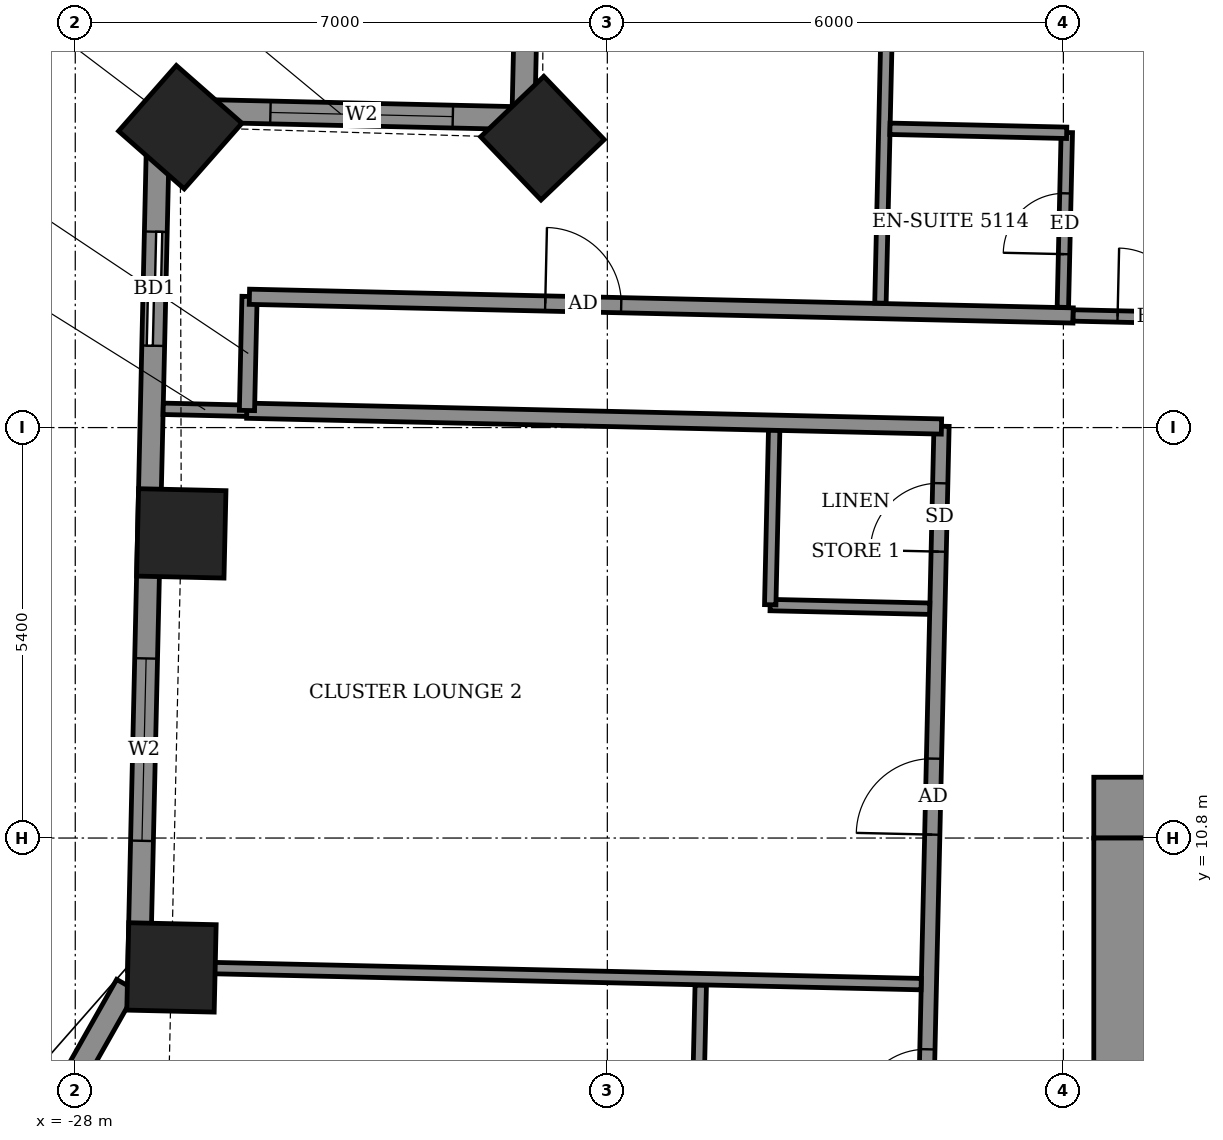
"""IFC4 building model, lengths in metres.
Left out: names, types, materials, properties, quantities, classifications, styles, units other than length and angle.
Written with IfcOpenShell. Run it as: python <this file> out.ifc"""

import sys

from ifc_helpers import new_model, si_unit, direction, frame, frame_2d, origin, origin_2d, place, context, subcontext, project, spatial, rectangle, extrude, element, fill, save


model = new_model("IFC4")
c1 = context("Model", 3, precision=1e-05, world=origin(), true_north=direction((0.0, 1.0)))
c2 = subcontext(c1, "Body", "Model", "MODEL_VIEW")
j1 = project(units=[si_unit("LENGTHUNIT", "METRE"), si_unit("PLANEANGLEUNIT", "RADIAN")], contexts=[c1])
p1 = place(None, origin())
s1 = spatial("IfcSite", under=j1, at=p1, CompositionType="ELEMENT")
p2 = place(p1, origin())
s2 = spatial("IfcBuilding", under=s1, at=p2, CompositionType="ELEMENT")
p3 = place(p2, frame((0.0, 0.0, 201.5)))
s3 = spatial("IfcBuildingStorey", under=s2, at=p3, CompositionType="ELEMENT", Elevation=201.5)
for number, where, z_axis, x_axis in (
    (1, (-21.854, 20.007, -0.55), (0.0, 0.0, 1.0), (-0.723, -0.691, 0.0)),
    (2, (-26.618, 20.152, -0.55), (0.0, 0.0, 1.0), (-0.661, -0.751, 0.0)),
    (3, (-26.605, 14.808, -0.55), (0.0, 0.0, 1.0), (-0.023, -1.0, 0.0)),
    (4, (-26.734, 9.098, -0.55), (0.0, 0.0, 1.0), (-0.023, -1.0, 0.0)),
):
    element("IfcColumn", number, at=place(p3, frame(where, z_axis=z_axis, x_axis=x_axis)), inside=s3, PredefinedType="COLUMN", context=c2, shape_type="SweptSolid", body=[
        extrude(rectangle(XDim=1.15, YDim=1.15, at=origin_2d()), origin(), (0.0, 0.0, 1.0), 3.6),
    ])
p4 = place(p3, frame((-21.996, 25.069, 0.0), z_axis=(0.0, 0.0, 1.0), x_axis=(-0.022683280499, -0.999742701292, 0.0)))
e5 = element("IfcWall", 5, at=p4, inside=s3, PredefinedType="SOLIDWALL", context=c2, shape_type="SweptSolid", body=[
    extrude(rectangle(XDim=4.8, YDim=0.3, at=frame_2d((2.4, 0.0))), origin(), (0.0, 0.0, 1.0), 2.55),
])
p5 = place(p4, frame((1.484, 0.0, 0.9)))
e6 = element("IfcOpeningElement", 6, at=p5, cuts=e5, PredefinedType="OPENING", context=c2, shape_type="SweptSolid", body=[
    extrude(rectangle(XDim=2.4, YDim=1.5, at=frame_2d((1.2, 0.75))), frame((0.0, 0.16, 0.0), z_axis=(0.0, -1.0, 0.0), x_axis=(1.0, 0.0, 0.0)), (0.0, 0.0, 1.0), 0.32),
])
p6 = place(p3, frame((-22.105, 20.27, 0.0), z_axis=(0.0, 0.0, 1.0), x_axis=(-0.999742701292, 0.022683280499, 0.0)))
e7 = element("IfcWall", 7, at=p6, inside=s3, PredefinedType="SOLIDWALL", context=c2, shape_type="SweptSolid", body=[
    extrude(rectangle(XDim=4.8, YDim=0.3, at=frame_2d((2.4, 0.0))), origin(), (0.0, 0.0, 1.0), 2.55),
])
p7 = place(p6, frame((0.928, 0.0, 0.9)))
e8 = element("IfcOpeningElement", 8, at=p7, cuts=e7, PredefinedType="OPENING", context=c2, shape_type="SweptSolid", body=[
    extrude(rectangle(XDim=2.4, YDim=1.5, at=frame_2d((1.2, 0.75))), frame((0.0, 0.16, 0.0), z_axis=(0.0, -1.0, 0.0), x_axis=(1.0, 0.0, 0.0)), (0.0, 0.0, 1.0), 0.32),
])
p8 = place(p3, frame((-26.904, 20.379, 0.0), z_axis=(0.0, 0.0, 1.0), x_axis=(-0.022669030322, -0.999743024514, 0.0)))
e9 = element("IfcWall", 9, at=p8, inside=s3, PredefinedType="SOLIDWALL", context=c2, shape_type="SweptSolid", body=[
    extrude(rectangle(XDim=11.33, YDim=0.3, at=frame_2d((5.665, 0.0))), origin(), (0.0, 0.0, 1.0), 2.55),
])
p9 = place(p8, frame((1.603, 0.0, 0.0)))
e10 = element("IfcOpeningElement", 10, at=p9, cuts=e9, PredefinedType="OPENING", context=c2, shape_type="SweptSolid", body=[
    extrude(rectangle(XDim=1.5, YDim=2.4, at=frame_2d((0.75, 1.2))), frame((0.0, 0.16, 0.0), z_axis=(0.0, -1.0, 0.0), x_axis=(1.0, 0.0, 0.0)), (0.0, 0.0, 1.0), 0.32),
])
p10 = place(p8, frame((7.218, 0.0, 0.9)))
e11 = element("IfcOpeningElement", 11, at=p10, cuts=e9, PredefinedType="OPENING", context=c2, shape_type="SweptSolid", body=[
    extrude(rectangle(XDim=2.4, YDim=1.5, at=frame_2d((1.2, 0.75))), frame((0.0, 0.16, 0.0), z_axis=(0.0, -1.0, 0.0), x_axis=(1.0, 0.0, 0.0)), (0.0, 0.0, 1.0), 0.32),
])
p11 = place(p3, frame((-27.325, 8.866, 0.0), z_axis=(0.0, 0.0, 1.0), x_axis=(-0.492554919955, -0.870281363025, 0.0)))
e12 = element("IfcWall", 12, at=p11, inside=s3, PredefinedType="SOLIDWALL", context=c2, shape_type="SweptSolid", body=[
    extrude(rectangle(XDim=5.398, YDim=0.3, at=frame_2d((2.699, 0.0))), origin(), (0.0, 0.0, 1.0), 3.05),
])
p12 = place(p11, frame((2.008, 0.0, 0.9)))
e13 = element("IfcOpeningElement", 13, at=p12, cuts=e12, PredefinedType="OPENING", context=c2, shape_type="SweptSolid", body=[
    extrude(rectangle(XDim=1.2, YDim=1.5, at=frame_2d((0.6, 0.75))), frame((0.0, 0.16, 0.0), z_axis=(0.0, -1.0, 0.0), x_axis=(1.0, 0.0, 0.0)), (0.0, 0.0, 1.0), 0.32),
])
p13 = place(p3, frame((-17.247, -12.149, 0.0), z_axis=(0.0, 0.0, 1.0), x_axis=(0.022698146637, 0.999742363881, 0.0)))
e14 = element("IfcWall", 14, at=p13, inside=s3, PredefinedType="PARTITIONING", context=c2, shape_type="SweptSolid", body=[
    extrude(rectangle(XDim=28.374, YDim=0.2, at=frame_2d((14.187, 0.0))), origin(), (0.0, 0.0, 1.0), 3.05),
])
p14 = place(p13, frame((23.0, 0.0, 0.0)))
e15 = element("IfcOpeningElement", 15, at=p14, cuts=e14, PredefinedType="OPENING", context=c2, shape_type="SweptSolid", body=[
    extrude(rectangle(XDim=1.0, YDim=2.1, at=frame_2d((0.5, 1.05))), frame((0.0, 0.11, 0.0), z_axis=(0.0, -1.0, 0.0), x_axis=(1.0, 0.0, 0.0)), (0.0, 0.0, 1.0), 0.22),
])
p15 = place(p13, frame((26.724, 0.0, 0.0)))
e16 = element("IfcOpeningElement", 16, at=p15, cuts=e14, PredefinedType="OPENING", context=c2, shape_type="SweptSolid", body=[
    extrude(rectangle(XDim=0.9, YDim=2.1, at=frame_2d((0.45, 1.05))), frame((0.0, 0.11, 0.0), z_axis=(0.0, -1.0, 0.0), x_axis=(1.0, 0.0, 0.0)), (0.0, 0.0, 1.0), 0.22),
])
p16 = place(p13, frame((17.025, 0.0, 0.0)))
e17 = element("IfcOpeningElement", 17, at=p16, cuts=e14, PredefinedType="OPENING", context=c2, shape_type="SweptSolid", body=[
    extrude(rectangle(XDim=1.0, YDim=2.1, at=frame_2d((0.5, 1.05))), frame((0.0, 0.11, 0.0), z_axis=(0.0, -1.0, 0.0), x_axis=(1.0, 0.0, 0.0)), (0.0, 0.0, 1.0), 0.22),
])
p17 = place(p13, frame((19.275, 0.0, 0.0)))
e18 = element("IfcOpeningElement", 18, at=p17, cuts=e14, PredefinedType="OPENING", context=c2, shape_type="SweptSolid", body=[
    extrude(rectangle(XDim=0.9, YDim=2.1, at=frame_2d((0.45, 1.05))), frame((0.0, 0.11, 0.0), z_axis=(0.0, -1.0, 0.0), x_axis=(1.0, 0.0, 0.0)), (0.0, 0.0, 1.0), 0.22),
])
p18 = place(p13, frame((14.95, 0.0, 0.0)))
e19 = element("IfcOpeningElement", 19, at=p18, cuts=e14, PredefinedType="OPENING", context=c2, shape_type="SweptSolid", body=[
    extrude(rectangle(XDim=1.0, YDim=2.1, at=frame_2d((0.5, 1.05))), frame((0.0, 0.11, 0.0), z_axis=(0.0, -1.0, 0.0), x_axis=(1.0, 0.0, 0.0)), (0.0, 0.0, 1.0), 0.22),
])
p19 = place(p13, frame((12.625, 0.0, 0.0)))
e20 = element("IfcOpeningElement", 20, at=p19, cuts=e14, PredefinedType="OPENING", context=c2, shape_type="SweptSolid", body=[
    extrude(rectangle(XDim=0.9, YDim=2.1, at=frame_2d((0.45, 1.05))), frame((0.0, 0.11, 0.0), z_axis=(0.0, -1.0, 0.0), x_axis=(1.0, 0.0, 0.0)), (0.0, 0.0, 1.0), 0.22),
])
p20 = place(p13, frame((10.275, 0.0, 0.0)))
e21 = element("IfcOpeningElement", 21, at=p20, cuts=e14, PredefinedType="OPENING", context=c2, shape_type="SweptSolid", body=[
    extrude(rectangle(XDim=1.0, YDim=2.1, at=frame_2d((0.5, 1.05))), frame((0.0, 0.11, 0.0), z_axis=(0.0, -1.0, 0.0), x_axis=(1.0, 0.0, 0.0)), (0.0, 0.0, 1.0), 0.22),
])
p21 = place(p13, frame((8.025, 0.0, 0.0)))
e22 = element("IfcOpeningElement", 22, at=p21, cuts=e14, PredefinedType="OPENING", context=c2, shape_type="SweptSolid", body=[
    extrude(rectangle(XDim=0.9, YDim=2.1, at=frame_2d((0.45, 1.05))), frame((0.0, 0.11, 0.0), z_axis=(0.0, -1.0, 0.0), x_axis=(1.0, 0.0, 0.0)), (0.0, 0.0, 1.0), 0.22),
])
p22 = place(p13, frame((4.337, 0.0, 0.0)))
e23 = element("IfcOpeningElement", 23, at=p22, cuts=e14, PredefinedType="OPENING", context=c2, shape_type="SweptSolid", body=[
    extrude(rectangle(XDim=1.0, YDim=2.1, at=frame_2d((0.5, 1.05))), frame((0.0, 0.11, 0.0), z_axis=(0.0, -1.0, 0.0), x_axis=(1.0, 0.0, 0.0)), (0.0, 0.0, 1.0), 0.22),
])
p23 = place(p13, frame((0.75, 0.0, 0.0)))
e24 = element("IfcOpeningElement", 24, at=p23, cuts=e14, PredefinedType="OPENING", context=c2, shape_type="SweptSolid", body=[
    extrude(rectangle(XDim=0.9, YDim=2.1, at=frame_2d((0.45, 1.05))), frame((0.0, 0.11, 0.0), z_axis=(0.0, -1.0, 0.0), x_axis=(1.0, 0.0, 0.0)), (0.0, 0.0, 1.0), 0.22),
])
p24 = place(p3, frame((-19.828, 6.34, 0.0), z_axis=(0.0, 0.0, 1.0), x_axis=(0.022532486354, 0.9997461113, 0.0)))
e25 = element("IfcWall", 25, at=p24, inside=s3, PredefinedType="PARTITIONING", context=c2, shape_type="SweptSolid", body=[
    extrude(rectangle(XDim=2.525, YDim=0.15, at=frame_2d((1.262, 0.0))), origin(), (0.0, 0.0, 1.0), 3.05),
])
p25 = place(p3, frame((-27.01, 9.108, 0.0), z_axis=(0.0, 0.0, 1.0), x_axis=(0.999742841246, -0.022677111331, 0.0)))
e26 = element("IfcWall", 26, at=p25, inside=s3, PredefinedType="PARTITIONING", context=c2, shape_type="SweptSolid", body=[
    extrude(rectangle(XDim=10.142, YDim=0.15, at=frame_2d((5.071, 0.0))), origin(), (0.0, 0.0, 1.0), 3.05),
])
p26 = place(p3, frame((-18.858, 13.865, 0.0), z_axis=(0.0, 0.0, 1.0), x_axis=(0.999737555419, -0.022908956429, 0.0)))
e27 = element("IfcWall", 27, at=p26, inside=s3, PredefinedType="PARTITIONING", context=c2, shape_type="SweptSolid", body=[
    extrude(rectangle(XDim=2.099, YDim=0.15, at=frame_2d((1.05, 0.0))), origin(), (0.0, 0.0, 1.0), 3.05),
])
p27 = place(p3, frame((-18.857, 13.869, 0.0), z_axis=(0.0, 0.0, 1.0), x_axis=(0.022612884682, 0.999744296031, 0.0)))
e28 = element("IfcWall", 28, at=p27, inside=s3, PredefinedType="PARTITIONING", context=c2, shape_type="SweptSolid", body=[
    extrude(rectangle(XDim=2.3, YDim=0.15, at=frame_2d((1.15, 0.0))), origin(), (0.0, 0.0, 1.0), 3.05),
])
p28 = place(p3, frame((-26.843, 16.447, 0.0), z_axis=(0.0, 0.0, 1.0), x_axis=(0.999720170098, -0.023655475055, 0.0)))
e29 = element("IfcWall", 29, at=p28, inside=s3, PredefinedType="PARTITIONING", context=c2, shape_type="SweptSolid", body=[
    extrude(rectangle(XDim=1.104, YDim=0.15, at=frame_2d((0.552, 0.0))), origin(), (0.0, 0.0, 1.0), 2.55),
])
p29 = place(p3, frame((-25.743, 16.422, 0.0), z_axis=(0.0, 0.0, 1.0), x_axis=(0.999741076645, -0.022754772455, 0.0)))
e30 = element("IfcWall", 30, at=p29, inside=s3, PredefinedType="PARTITIONING", context=c2, shape_type="SweptSolid", body=[
    extrude(rectangle(XDim=9.141, YDim=0.2, at=frame_2d((4.571, 0.0))), origin(), (0.0, 0.0, 1.0), 3.05),
])
p30 = place(p3, frame((-25.741, 16.425, 0.0), z_axis=(0.0, 0.0, 1.0), x_axis=(0.022617910375, 0.999744182344, 0.0)))
e31 = element("IfcWall", 31, at=p30, inside=s3, PredefinedType="PARTITIONING", context=c2, shape_type="SweptSolid", body=[
    extrude(rectangle(XDim=1.5, YDim=0.2, at=frame_2d((0.75, 0.0))), origin(), (0.0, 0.0, 1.0), 3.05),
])
p31 = place(p3, frame((-25.709, 17.921, 0.0), z_axis=(0.0, 0.0, 1.0), x_axis=(0.999742764922, -0.022680475901, 0.0)))
e32 = element("IfcWall", 32, at=p31, inside=s3, PredefinedType="PARTITIONING", context=c2, shape_type="SweptSolid", body=[
    extrude(rectangle(XDim=10.84, YDim=0.2, at=frame_2d((5.42, 0.0))), origin(), (0.0, 0.0, 1.0), 3.05),
])
p32 = place(p31, frame((3.893, 0.0, 0.0)))
e33 = element("IfcOpeningElement", 33, at=p32, cuts=e32, PredefinedType="OPENING", context=c2, shape_type="SweptSolid", body=[
    extrude(rectangle(XDim=1.0, YDim=2.1, at=frame_2d((0.5, 1.05))), frame((0.0, 0.11, 0.0), z_axis=(0.0, -1.0, 0.0), x_axis=(1.0, 0.0, 0.0)), (0.0, 0.0, 1.0), 0.22),
])
p33 = place(p3, frame((-14.871, 17.675, 0.0), z_axis=(0.0, 0.0, 1.0), x_axis=(0.999742359486, -0.02269834024, 0.0)))
e34 = element("IfcWall", 34, at=p33, inside=s3, PredefinedType="PARTITIONING", context=c2, shape_type="SweptSolid", body=[
    extrude(rectangle(XDim=30.536, YDim=0.15, at=frame_2d((15.268, 0.0))), origin(), (0.0, 0.0, 1.0), 3.05),
])
p34 = place(p33, frame((28.159, 0.0, 0.0)))
e35 = element("IfcOpeningElement", 35, at=p34, cuts=e34, PredefinedType="OPENING", context=c2, shape_type="SweptSolid", body=[
    extrude(rectangle(XDim=0.9, YDim=2.1, at=frame_2d((0.45, 1.05))), frame((0.0, 0.085, 0.0), z_axis=(0.0, -1.0, 0.0), x_axis=(1.0, 0.0, 0.0)), (0.0, 0.0, 1.0), 0.17),
])
p35 = place(p33, frame((21.034, 0.0, 0.0)))
e36 = element("IfcOpeningElement", 36, at=p35, cuts=e34, PredefinedType="OPENING", context=c2, shape_type="SweptSolid", body=[
    extrude(rectangle(XDim=0.9, YDim=2.1, at=frame_2d((0.45, 1.05))), frame((0.0, 0.085, 0.0), z_axis=(0.0, -1.0, 0.0), x_axis=(1.0, 0.0, 0.0)), (0.0, 0.0, 1.0), 0.17),
])
p36 = place(p33, frame((18.684, 0.0, 0.0)))
e37 = element("IfcOpeningElement", 37, at=p36, cuts=e34, PredefinedType="OPENING", context=c2, shape_type="SweptSolid", body=[
    extrude(rectangle(XDim=0.9, YDim=2.1, at=frame_2d((0.45, 1.05))), frame((0.0, 0.085, 0.0), z_axis=(0.0, -1.0, 0.0), x_axis=(1.0, 0.0, 0.0)), (0.0, 0.0, 1.0), 0.17),
])
p37 = place(p33, frame((11.709, 0.0, 0.0)))
e38 = element("IfcOpeningElement", 38, at=p37, cuts=e34, PredefinedType="OPENING", context=c2, shape_type="SweptSolid", body=[
    extrude(rectangle(XDim=0.9, YDim=2.1, at=frame_2d((0.45, 1.05))), frame((0.0, 0.085, 0.0), z_axis=(0.0, -1.0, 0.0), x_axis=(1.0, 0.0, 0.0)), (0.0, 0.0, 1.0), 0.17),
])
p38 = place(p33, frame((9.734, 0.0, 0.0)))
e39 = element("IfcOpeningElement", 39, at=p38, cuts=e34, PredefinedType="OPENING", context=c2, shape_type="SweptSolid", body=[
    extrude(rectangle(XDim=0.9, YDim=2.1, at=frame_2d((0.45, 1.05))), frame((0.0, 0.085, 0.0), z_axis=(0.0, -1.0, 0.0), x_axis=(1.0, 0.0, 0.0)), (0.0, 0.0, 1.0), 0.17),
])
p39 = place(p33, frame((2.859, 0.0, 0.0)))
e40 = element("IfcOpeningElement", 40, at=p39, cuts=e34, PredefinedType="OPENING", context=c2, shape_type="SweptSolid", body=[
    extrude(rectangle(XDim=0.9, YDim=2.1, at=frame_2d((0.45, 1.05))), frame((0.0, 0.085, 0.0), z_axis=(0.0, -1.0, 0.0), x_axis=(1.0, 0.0, 0.0)), (0.0, 0.0, 1.0), 0.17),
])
p40 = place(p33, frame((0.584, 0.0, 0.0)))
e41 = element("IfcOpeningElement", 41, at=p40, cuts=e34, PredefinedType="OPENING", context=c2, shape_type="SweptSolid", body=[
    extrude(rectangle(XDim=0.9, YDim=2.1, at=frame_2d((0.45, 1.05))), frame((0.0, 0.085, 0.0), z_axis=(0.0, -1.0, 0.0), x_axis=(1.0, 0.0, 0.0)), (0.0, 0.0, 1.0), 0.17),
])
p41 = place(p3, frame((-17.407, 17.837, 0.0), z_axis=(0.0, 0.0, 1.0), x_axis=(0.022643496158, 0.999743603171, 0.0)))
e42 = element("IfcWall", 42, at=p41, inside=s3, PredefinedType="PARTITIONING", context=c2, shape_type="SweptSolid", body=[
    extrude(rectangle(XDim=6.976, YDim=0.15, at=frame_2d((3.488, 0.0))), origin(), (0.0, 0.0, 1.0), 2.55),
])
p42 = place(p3, frame((-15.007, 17.782, 0.0), z_axis=(0.0, 0.0, 1.0), x_axis=(0.022603288534, 0.999744513037, 0.0)))
e43 = element("IfcWall", 43, at=p42, inside=s3, PredefinedType="PARTITIONING", context=c2, shape_type="SweptSolid", body=[
    extrude(rectangle(XDim=2.301, YDim=0.15, at=frame_2d((1.15, 0.0))), origin(), (0.0, 0.0, 1.0), 3.05),
])
p43 = place(p42, frame((0.7, 0.0, 0.0)))
e44 = element("IfcOpeningElement", 44, at=p43, cuts=e43, PredefinedType="OPENING", context=c2, shape_type="SweptSolid", body=[
    extrude(rectangle(XDim=0.8, YDim=2.1, at=frame_2d((0.4, 1.05))), frame((0.0, 0.085, 0.0), z_axis=(0.0, -1.0, 0.0), x_axis=(1.0, 0.0, 0.0)), (0.0, 0.0, 1.0), 0.17),
])
p44 = place(p3, frame((-17.282, 20.131, 0.0), z_axis=(0.0, 0.0, 1.0), x_axis=(0.999738082346, -0.022885950011, 0.0)))
e45 = element("IfcWall", 45, at=p44, inside=s3, PredefinedType="PARTITIONING", context=c2, shape_type="SweptSolid", body=[
    extrude(rectangle(XDim=2.325, YDim=0.15, at=frame_2d((1.163, 0.0))), origin(), (0.0, 0.0, 1.0), 3.05),
])
p45 = place(p3, frame((-14.6, 11.2, 0.0), z_axis=(0.0, 0.0, 1.0), x_axis=(1.0, 0.0, 0.0)))
e46 = element("IfcWall", 46, at=p45, inside=s3, PredefinedType="SHEAR", context=c2, shape_type="SweptSolid", body=[
    extrude(rectangle(XDim=29.2, YDim=0.8, at=frame_2d((14.6, 0.0))), origin(), (0.0, 0.0, 1.0), 3.6),
])
p46 = place(p3, frame((-14.2, -10.8, 0.0), z_axis=(0.0, 0.0, 1.0), x_axis=(0.0, 1.0, 0.0)))
e47 = element("IfcWall", 47, at=p46, inside=s3, PredefinedType="SHEAR", context=c2, shape_type="SweptSolid", body=[
    extrude(rectangle(XDim=21.6, YDim=0.8, at=frame_2d((10.8, 0.0))), origin(), (0.0, 0.0, 1.0), 3.6),
])
p47 = place(p46, frame((8.25, 0.0, 0.0)))
e48 = element("IfcOpeningElement", 48, at=p47, cuts=e47, PredefinedType="OPENING", context=c2, shape_type="SweptSolid", body=[
    extrude(rectangle(XDim=1.2, YDim=2.1, at=frame_2d((0.6, 1.05))), frame((0.0, 0.41, 0.0), z_axis=(0.0, -1.0, 0.0), x_axis=(1.0, 0.0, 0.0)), (0.0, 0.0, 1.0), 0.82),
])
p48 = place(p46, frame((15.25, 0.0, 0.0)))
e49 = element("IfcOpeningElement", 49, at=p48, cuts=e47, PredefinedType="OPENING", context=c2, shape_type="SweptSolid", body=[
    extrude(rectangle(XDim=1.2, YDim=2.1, at=frame_2d((0.6, 1.05))), frame((0.0, 0.41, 0.0), z_axis=(0.0, -1.0, 0.0), x_axis=(1.0, 0.0, 0.0)), (0.0, 0.0, 1.0), 0.82),
])
p49 = place(p7, origin())
e50 = element("IfcWindow", 50, at=p49, inside=s3, PartitioningType="DOUBLE_PANEL_VERTICAL", PredefinedType="WINDOW", context=c2, shape_type="SweptSolid", body=[
    extrude(rectangle(XDim=2.4, YDim=1.5, at=frame_2d((1.2, 0.75))), frame((0.0, 0.03, 0.0), z_axis=(0.0, -1.0, 0.0), x_axis=(1.0, 0.0, 0.0)), (0.0, 0.0, 1.0), 0.06),
])
fill(e8, e50)
p50 = place(p9, origin())
e51 = element("IfcDoor", 51, at=p50, inside=s3, OperationType="SLIDING_TO_LEFT", PredefinedType="DOOR", context=c2, shape_type="SweptSolid", body=[
    extrude(rectangle(XDim=1.5, YDim=2.4, at=frame_2d((0.75, 1.2))), frame((0.0, 0.025, 0.0), z_axis=(0.0, -1.0, 0.0), x_axis=(1.0, 0.0, 0.0)), (0.0, 0.0, 1.0), 0.05),
])
fill(e10, e51)
p51 = place(p10, origin())
e52 = element("IfcWindow", 52, at=p51, inside=s3, PartitioningType="DOUBLE_PANEL_VERTICAL", PredefinedType="WINDOW", context=c2, shape_type="SweptSolid", body=[
    extrude(rectangle(XDim=2.4, YDim=1.5, at=frame_2d((1.2, 0.75))), frame((0.0, 0.03, 0.0), z_axis=(0.0, -1.0, 0.0), x_axis=(1.0, 0.0, 0.0)), (0.0, 0.0, 1.0), 0.06),
])
fill(e11, e52)
p52 = place(p40, origin())
e53 = element("IfcDoor", 53, at=p52, inside=s3, OperationType="SINGLE_SWING_RIGHT", PredefinedType="DOOR", context=c2, shape_type="SweptSolid", body=[
    extrude(rectangle(XDim=0.9, YDim=2.1, at=frame_2d((0.45, 1.05))), frame((0.0, 0.025, 0.0), z_axis=(0.0, -1.0, 0.0), x_axis=(1.0, 0.0, 0.0)), (0.0, 0.0, 1.0), 0.05),
])
fill(e41, e53)
p53 = place(p43, origin())
e54 = element("IfcDoor", 54, at=p53, inside=s3, OperationType="SINGLE_SWING_RIGHT", PredefinedType="DOOR", context=c2, shape_type="SweptSolid", body=[
    extrude(rectangle(XDim=0.8, YDim=2.1, at=frame_2d((0.4, 1.05))), frame((0.0, 0.025, 0.0), z_axis=(0.0, -1.0, 0.0), x_axis=(1.0, 0.0, 0.0)), (0.0, 0.0, 1.0), 0.05),
])
fill(e44, e54)
p54 = place(p32, origin())
e55 = element("IfcDoor", 55, at=p54, inside=s3, OperationType="SINGLE_SWING_RIGHT", PredefinedType="DOOR", context=c2, shape_type="SweptSolid", body=[
    extrude(rectangle(XDim=1.0, YDim=2.1, at=frame_2d((0.5, 1.05))), frame((0.0, 0.025, 0.0), z_axis=(0.0, -1.0, 0.0), x_axis=(1.0, 0.0, 0.0)), (0.0, 0.0, 1.0), 0.05),
])
fill(e33, e55)
p55 = place(p14, origin())
e56 = element("IfcDoor", 56, at=p55, inside=s3, OperationType="SINGLE_SWING_LEFT", PredefinedType="DOOR", context=c2, shape_type="SweptSolid", body=[
    extrude(rectangle(XDim=1.0, YDim=2.1, at=frame_2d((0.5, 1.05))), frame((0.0, 0.025, 0.0), z_axis=(0.0, -1.0, 0.0), x_axis=(1.0, 0.0, 0.0)), (0.0, 0.0, 1.0), 0.05),
])
fill(e15, e56)
p56 = place(p15, origin())
e57 = element("IfcDoor", 57, at=p56, inside=s3, OperationType="SINGLE_SWING_RIGHT", PredefinedType="DOOR", context=c2, shape_type="SweptSolid", body=[
    extrude(rectangle(XDim=0.9, YDim=2.1, at=frame_2d((0.45, 1.05))), frame((0.0, 0.025, 0.0), z_axis=(0.0, -1.0, 0.0), x_axis=(1.0, 0.0, 0.0)), (0.0, 0.0, 1.0), 0.05),
])
fill(e16, e57)
p57 = place(p17, origin())
e58 = element("IfcDoor", 58, at=p57, inside=s3, OperationType="SINGLE_SWING_LEFT", PredefinedType="DOOR", context=c2, shape_type="SweptSolid", body=[
    extrude(rectangle(XDim=0.9, YDim=2.1, at=frame_2d((0.45, 1.05))), frame((0.0, 0.025, 0.0), z_axis=(0.0, -1.0, 0.0), x_axis=(1.0, 0.0, 0.0)), (0.0, 0.0, 1.0), 0.05),
])
fill(e18, e58)
save(model, sys.argv[1])
